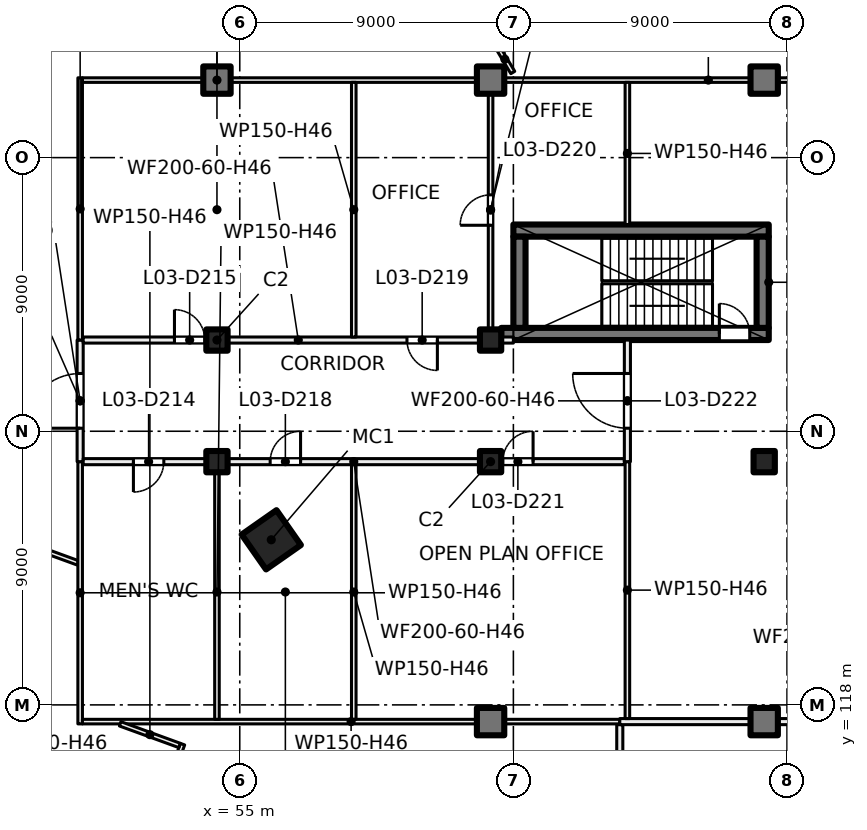
"""IFC4 building model, lengths in metres.
Left out: names, types, materials, properties, quantities, classifications, styles, units other than length and angle.
Written with IfcOpenShell. Run it as: python <this file> out.ifc"""

import sys

from ifc_helpers import new_model, si_unit, direction, frame, frame_2d, origin, origin_2d, place, context, subcontext, project, spatial, rectangle, hollow_rectangle, extrude, element, fill, save


model = new_model("IFC4")
c1 = context("Model", 3, precision=1e-05, world=origin(), true_north=direction((0.0, 1.0)))
c2 = subcontext(c1, "Body", "Model", "MODEL_VIEW")
j1 = project(units=[si_unit("LENGTHUNIT", "METRE"), si_unit("PLANEANGLEUNIT", "RADIAN")], contexts=[c1])
p1 = place(None, origin())
s1 = spatial("IfcSite", under=j1, at=p1, CompositionType="ELEMENT")
p2 = place(p1, origin())
s2 = spatial("IfcBuilding", under=s1, at=p2, CompositionType="ELEMENT")
p3 = place(p2, frame((0.0, 0.0, 17.5)))
s3 = spatial("IfcBuildingStorey", under=s2, at=p3, CompositionType="ELEMENT", Elevation=17.5)
p4 = place(p3, frame((56.036, 123.43, 0.0), z_axis=(0.0, 0.0, 1.0), x_axis=(0.573576436351, -0.819152044289, 0.0)))
e1 = element("IfcColumn", 1, at=p4, inside=s3, PredefinedType="COLUMN", context=c2, shape_type="SweptSolid", body=[
    extrude(hollow_rectangle(XDim=1.4, YDim=1.4, WallThickness=0.04, at=origin_2d()), origin(), (0.0, 0.0, 1.0), 5.0),
])
for number, where, z_axis, x_axis in (
    (2, (54.25, 130.0, 0.0), (0.0, 0.0, 1.0), (1.0, 0.0, 0.0)),
    (3, (63.25, 130.0, 0.0), (0.0, 0.0, 1.0), (1.0, 0.0, 0.0)),
    (4, (54.25, 126.0, 0.0), (0.0, 0.0, 1.0), (1.0, 0.0, 0.0)),
    (5, (63.25, 126.0, 0.0), (0.0, 0.0, 1.0), (1.0, 0.0, 0.0)),
    (6, (72.25, 126.0, 0.0), (0.0, 0.0, 1.0), (1.0, 0.0, 0.0)),
):
    element("IfcColumn", number, at=place(p3, frame(where, z_axis=z_axis, x_axis=x_axis)), inside=s3, PredefinedType="COLUMN", context=c2, shape_type="SweptSolid", body=[
        extrude(rectangle(XDim=0.7, YDim=0.7, at=origin_2d()), origin(), (0.0, 0.0, 1.0), 5.0),
    ])
for number, where, z_axis, x_axis in (
    (7, (54.25, 138.55, 0.0), (0.0, 0.0, 1.0), (1.0, 0.0, 0.0)),
    (8, (63.25, 138.55, 0.0), (0.0, 0.0, 1.0), (1.0, 0.0, 0.0)),
    (9, (72.25, 138.55, 0.0), (0.0, 0.0, 1.0), (1.0, 0.0, 0.0)),
    (10, (63.25, 117.45, 0.0), (0.0, 0.0, 1.0), (1.0, 0.0, 0.0)),
    (11, (72.25, 117.45, 0.0), (0.0, 0.0, 1.0), (1.0, 0.0, 0.0)),
):
    element("IfcColumn", number, at=place(p3, frame(where, z_axis=z_axis, x_axis=x_axis)), inside=s3, PredefinedType="COLUMN", context=c2, shape_type="SweptSolid", body=[
        extrude(rectangle(XDim=0.9, YDim=0.9, at=origin_2d()), origin(), (0.0, 0.0, 1.0), 5.0),
    ])
p5 = place(p3, frame((63.6, 130.2, 0.0), z_axis=(0.0, 0.0, 1.0), x_axis=(1.0, 0.0, 0.0)))
e12 = element("IfcWall", 12, at=p5, inside=s3, PredefinedType="SHEAR", context=c2, shape_type="SweptSolid", body=[
    extrude(rectangle(XDim=8.8, YDim=0.4, at=frame_2d((4.4, 0.0))), origin(), (0.0, 0.0, 1.0), 5.0),
])
p6 = place(p5, frame((7.175, 0.0, 0.0)))
e13 = element("IfcOpeningElement", 13, at=p6, cuts=e12, PredefinedType="OPENING", context=c2, shape_type="SweptSolid", body=[
    extrude(rectangle(XDim=1.0, YDim=2.1, at=frame_2d((0.5, 1.05))), frame((0.0, 0.21, 0.0), z_axis=(0.0, -1.0, 0.0), x_axis=(1.0, 0.0, 0.0)), (0.0, 0.0, 1.0), 0.42),
])
p7 = place(p3, frame((64.0, 133.6, 0.0), z_axis=(0.0, 0.0, 1.0), x_axis=(1.0, 0.0, 0.0)))
e14 = element("IfcWall", 14, at=p7, inside=s3, PredefinedType="SHEAR", context=c2, shape_type="SweptSolid", body=[
    extrude(rectangle(XDim=8.4, YDim=0.4, at=frame_2d((4.2, 0.0))), origin(), (0.0, 0.0, 1.0), 5.0),
])
for number, where, z_axis, x_axis in (
    (15, (64.2, 130.4, 0.0), (0.0, 0.0, 1.0), (0.0, 1.0, 0.0)),
    (16, (72.2, 130.4, 0.0), (0.0, 0.0, 1.0), (0.0, 1.0, 0.0)),
):
    element("IfcWall", number, at=place(p3, frame(where, z_axis=z_axis, x_axis=x_axis)), inside=s3, PredefinedType="SHEAR", context=c2, shape_type="SweptSolid", body=[
        extrude(rectangle(XDim=3.0, YDim=0.4, at=frame_2d((1.5, 0.0))), origin(), (0.0, 0.0, 1.0), 5.0),
    ])
p8 = place(p3, frame((46.597, 123.792, 0.0), z_axis=(0.0, 0.0, 1.0), x_axis=(0.939619227089, -0.342221723572, 0.0)))
e17 = element("IfcWall", 17, at=p8, inside=s3, PredefinedType="PARTITIONING", context=c2, shape_type="SweptSolid", body=[
    extrude(rectangle(XDim=3.276, YDim=0.15, at=frame_2d((1.638, 0.0))), origin(), (0.0, 0.0, 1.0), 4.6),
])
p9 = place(p3, frame((48.475, 103.953, 0.0), z_axis=(0.0, 0.0, 1.0), x_axis=(0.342018860609, 0.939693087656, 0.0)))
e18 = element("IfcWall", 18, at=p9, inside=s3, PredefinedType="PARTITIONING", context=c2, shape_type="SweptSolid", body=[
    extrude(rectangle(XDim=13.575, YDim=0.15, at=frame_2d((6.787, 0.0))), origin(), (0.0, 0.0, 1.0), 4.6),
])
p10 = place(p3, frame((49.75, 117.375, 0.0), z_axis=(0.0, 0.0, 1.0), x_axis=(0.0, 1.0, 0.0)))
e19 = element("IfcWall", 19, at=p10, inside=s3, PredefinedType="PARTITIONING", context=c2, shape_type="SweptSolid", body=[
    extrude(rectangle(XDim=8.625, YDim=0.15, at=frame_2d((4.312, 0.0))), origin(), (0.0, 0.0, 1.0), 4.6),
])
p11 = place(p3, frame((49.825, 117.45, 0.0), z_axis=(0.0, 0.0, 1.0), x_axis=(1.0, 0.0, 0.0)))
e20 = element("IfcWall", 20, at=p11, inside=s3, PredefinedType="PARTITIONING", context=c2, shape_type="SweptSolid", body=[
    extrude(rectangle(XDim=17.675, YDim=0.15, at=frame_2d((8.837, 0.0))), origin(), (0.0, 0.0, 1.0), 4.6),
])
p12 = place(p3, frame((49.75, 126.0, 0.0), z_axis=(0.0, 0.0, 1.0), x_axis=(0.0, 1.0, 0.0)))
e21 = element("IfcWall", 21, at=p12, inside=s3, PredefinedType="PARTITIONING", context=c2, shape_type="SweptSolid", body=[
    extrude(rectangle(XDim=4.0, YDim=0.2, at=frame_2d((2.0, 0.0))), origin(), (0.0, 0.0, 1.0), 4.6),
])
p13 = place(p12, frame((1.1, 0.0, 0.0)))
e22 = element("IfcOpeningElement", 22, at=p13, cuts=e21, PredefinedType="OPENING", context=c2, shape_type="SweptSolid", body=[
    extrude(rectangle(XDim=1.8, YDim=2.1, at=frame_2d((0.9, 1.05))), frame((0.0, 0.11, 0.0), z_axis=(0.0, -1.0, 0.0), x_axis=(1.0, 0.0, 0.0)), (0.0, 0.0, 1.0), 0.22),
])
p14 = place(p3, frame((67.65, 126.0, 0.0), z_axis=(0.0, 0.0, 1.0), x_axis=(-1.0, 0.0, 0.0)))
e23 = element("IfcWall", 23, at=p14, inside=s3, PredefinedType="PARTITIONING", context=c2, shape_type="SweptSolid", body=[
    extrude(rectangle(XDim=17.8, YDim=0.2, at=frame_2d((8.9, 0.0))), origin(), (0.0, 0.0, 1.0), 4.6),
])
p15 = place(p14, frame((15.148, 0.0, 0.0)))
e24 = element("IfcOpeningElement", 24, at=p15, cuts=e23, PredefinedType="OPENING", context=c2, shape_type="SweptSolid", body=[
    extrude(rectangle(XDim=1.0, YDim=2.1, at=frame_2d((0.5, 1.05))), frame((0.0, 0.11, 0.0), z_axis=(0.0, -1.0, 0.0), x_axis=(1.0, 0.0, 0.0)), (0.0, 0.0, 1.0), 0.22),
])
p16 = place(p14, frame((10.65, 0.0, 0.0)))
e25 = element("IfcOpeningElement", 25, at=p16, cuts=e23, PredefinedType="OPENING", context=c2, shape_type="SweptSolid", body=[
    extrude(rectangle(XDim=1.0, YDim=2.1, at=frame_2d((0.5, 1.05))), frame((0.0, 0.11, 0.0), z_axis=(0.0, -1.0, 0.0), x_axis=(1.0, 0.0, 0.0)), (0.0, 0.0, 1.0), 0.22),
])
p17 = place(p14, frame((3.002, 0.0, 0.0)))
e26 = element("IfcOpeningElement", 26, at=p17, cuts=e23, PredefinedType="OPENING", context=c2, shape_type="SweptSolid", body=[
    extrude(rectangle(XDim=1.0, YDim=2.1, at=frame_2d((0.5, 1.05))), frame((0.0, 0.11, 0.0), z_axis=(0.0, -1.0, 0.0), x_axis=(1.0, 0.0, 0.0)), (0.0, 0.0, 1.0), 0.22),
])
p18 = place(p3, frame((49.75, 130.0, 0.0), z_axis=(0.0, 0.0, 1.0), x_axis=(0.0, 1.0, 0.0)))
e27 = element("IfcWall", 27, at=p18, inside=s3, PredefinedType="PARTITIONING", context=c2, shape_type="SweptSolid", body=[
    extrude(rectangle(XDim=8.625, YDim=0.15, at=frame_2d((4.312, 0.0))), origin(), (0.0, 0.0, 1.0), 4.6),
])
p19 = place(p3, frame((49.85, 130.0, 0.0), z_axis=(0.0, 0.0, 1.0), x_axis=(1.0, 0.0, 0.0)))
e28 = element("IfcWall", 28, at=p19, inside=s3, PredefinedType="PARTITIONING", context=c2, shape_type="SweptSolid", body=[
    extrude(rectangle(XDim=14.15, YDim=0.2, at=frame_2d((7.075, 0.0))), origin(), (0.0, 0.0, 1.0), 4.6),
])
p20 = place(p19, frame((3.002, 0.0, 0.0)))
e29 = element("IfcOpeningElement", 29, at=p20, cuts=e28, PredefinedType="OPENING", context=c2, shape_type="SweptSolid", body=[
    extrude(rectangle(XDim=1.0, YDim=2.1, at=frame_2d((0.5, 1.05))), frame((0.0, 0.11, 0.0), z_axis=(0.0, -1.0, 0.0), x_axis=(1.0, 0.0, 0.0)), (0.0, 0.0, 1.0), 0.22),
])
p21 = place(p19, frame((10.65, 0.0, 0.0)))
e30 = element("IfcOpeningElement", 30, at=p21, cuts=e28, PredefinedType="OPENING", context=c2, shape_type="SweptSolid", body=[
    extrude(rectangle(XDim=1.0, YDim=2.1, at=frame_2d((0.5, 1.05))), frame((0.0, 0.11, 0.0), z_axis=(0.0, -1.0, 0.0), x_axis=(1.0, 0.0, 0.0)), (0.0, 0.0, 1.0), 0.22),
])
p22 = place(p3, frame((49.825, 138.55, 0.0), z_axis=(0.0, 0.0, 1.0), x_axis=(1.0, 0.0, 0.0)))
e31 = element("IfcWall", 31, at=p22, inside=s3, PredefinedType="PARTITIONING", context=c2, shape_type="SweptSolid", body=[
    extrude(rectangle(XDim=41.175, YDim=0.15, at=frame_2d((20.587, 0.0))), origin(), (0.0, 0.0, 1.0), 4.6),
])
p23 = place(p22, frame((37.775, 0.0, 0.0)))
e32 = element("IfcOpeningElement", 32, at=p23, cuts=e31, PredefinedType="OPENING", context=c2, shape_type="SweptSolid", body=[
    extrude(rectangle(XDim=1.8, YDim=2.1, at=frame_2d((0.9, 1.05))), frame((0.0, 0.085, 0.0), z_axis=(0.0, -1.0, 0.0), x_axis=(1.0, 0.0, 0.0)), (0.0, 0.0, 1.0), 0.17),
])
p24 = place(p3, frame((51.066, 117.377, 0.0), z_axis=(0.0, 0.0, 1.0), x_axis=(0.939697502841, -0.342006729691, 0.0)))
e33 = element("IfcWall", 33, at=p24, inside=s3, PredefinedType="PARTITIONING", context=c2, shape_type="SweptSolid", body=[
    extrude(rectangle(XDim=2.082, YDim=0.15, at=frame_2d((1.041, 0.0))), origin(), (0.0, 0.0, 1.0), 4.6),
])
for number, where, z_axis, x_axis in (
    (34, (54.25, 117.525, 0.0), (0.0, 0.0, 1.0), (0.0, 1.0, 0.0)),
    (35, (58.75, 117.525, 0.0), (0.0, 0.0, 1.0), (0.0, 1.0, 0.0)),
    (36, (58.75, 130.1, 0.0), (0.0, 0.0, 1.0), (0.0, 1.0, 0.0)),
):
    element("IfcWall", number, at=place(p3, frame(where, z_axis=z_axis, x_axis=x_axis)), inside=s3, PredefinedType="PARTITIONING", context=c2, shape_type="SweptSolid", body=[
        extrude(rectangle(XDim=8.375, YDim=0.15, at=frame_2d((4.188, 0.0))), origin(), (0.0, 0.0, 1.0), 4.6),
    ])
p25 = place(p3, frame((63.25, 130.1, 0.0), z_axis=(0.0, 0.0, 1.0), x_axis=(0.0, 1.0, 0.0)))
e37 = element("IfcWall", 37, at=p25, inside=s3, PredefinedType="PARTITIONING", context=c2, shape_type="SweptSolid", body=[
    extrude(rectangle(XDim=8.375, YDim=0.15, at=frame_2d((4.188, 0.0))), origin(), (0.0, 0.0, 1.0), 4.6),
])
p26 = place(p25, frame((3.675, 0.0, 0.0)))
e38 = element("IfcOpeningElement", 38, at=p26, cuts=e37, PredefinedType="OPENING", context=c2, shape_type="SweptSolid", body=[
    extrude(rectangle(XDim=1.0, YDim=2.1, at=frame_2d((0.5, 1.05))), frame((0.0, 0.085, 0.0), z_axis=(0.0, -1.0, 0.0), x_axis=(1.0, 0.0, 0.0)), (0.0, 0.0, 1.0), 0.17),
])
p27 = place(p3, frame((63.459, 139.67, 0.0), z_axis=(0.0, 0.0, 1.0), x_axis=(0.514106720628, -0.857726226604, 0.0)))
e39 = element("IfcWall", 39, at=p27, inside=s3, PredefinedType="PARTITIONING", context=c2, shape_type="SweptSolid", body=[
    extrude(rectangle(XDim=1.015, YDim=0.15, at=frame_2d((0.508, 0.0))), origin(), (0.0, 0.0, 1.0), 4.6),
])
p28 = place(p3, frame((67.5, 109.1, 0.0), z_axis=(0.0, 0.0, 1.0), x_axis=(0.0, 1.0, 0.0)))
e40 = element("IfcWall", 40, at=p28, inside=s3, PredefinedType="PARTITIONING", context=c2, shape_type="SweptSolid", body=[
    extrude(rectangle(XDim=8.25, YDim=0.2, at=frame_2d((4.125, 0.0))), origin(), (0.0, 0.0, 1.0), 3.6),
])
p29 = place(p3, frame((67.5, 117.45, 0.0), z_axis=(0.0, 0.0, 1.0), x_axis=(1.0, 0.0, 0.0)))
e41 = element("IfcWall", 41, at=p29, inside=s3, PredefinedType="PARTITIONING", context=c2, shape_type="SweptSolid", body=[
    extrude(rectangle(XDim=13.5, YDim=0.2, at=frame_2d((6.75, 0.0))), origin(), (0.0, 0.0, 1.0), 4.6),
])
p30 = place(p29, frame((5.977, 0.0, 0.0)))
e42 = element("IfcOpeningElement", 42, at=p30, cuts=e41, PredefinedType="OPENING", context=c2, shape_type="SweptSolid", body=[
    extrude(rectangle(XDim=1.8, YDim=2.1, at=frame_2d((0.9, 1.05))), frame((0.0, 0.11, 0.0), z_axis=(0.0, -1.0, 0.0), x_axis=(1.0, 0.0, 0.0)), (0.0, 0.0, 1.0), 0.22),
])
p31 = place(p3, frame((67.75, 117.55, 0.0), z_axis=(0.0, 0.0, 1.0), x_axis=(0.0, 1.0, 0.0)))
e43 = element("IfcWall", 43, at=p31, inside=s3, PredefinedType="PARTITIONING", context=c2, shape_type="SweptSolid", body=[
    extrude(rectangle(XDim=8.45, YDim=0.15, at=frame_2d((4.225, 0.0))), origin(), (0.0, 0.0, 1.0), 4.6),
])
p32 = place(p3, frame((67.75, 130.0, 0.0), z_axis=(0.0, 0.0, 1.0), x_axis=(0.0, -1.0, 0.0)))
e44 = element("IfcWall", 44, at=p32, inside=s3, PredefinedType="PARTITIONING", context=c2, shape_type="SweptSolid", body=[
    extrude(rectangle(XDim=4.0, YDim=0.2, at=frame_2d((2.0, 0.0))), origin(), (0.0, 0.0, 1.0), 4.6),
])
p33 = place(p32, frame((1.1, 0.0, 0.0)))
e45 = element("IfcOpeningElement", 45, at=p33, cuts=e44, PredefinedType="OPENING", context=c2, shape_type="SweptSolid", body=[
    extrude(rectangle(XDim=1.8, YDim=2.1, at=frame_2d((0.9, 1.05))), frame((0.0, 0.11, 0.0), z_axis=(0.0, -1.0, 0.0), x_axis=(1.0, 0.0, 0.0)), (0.0, 0.0, 1.0), 0.22),
])
p34 = place(p3, frame((67.75, 133.8, 0.0), z_axis=(0.0, 0.0, 1.0), x_axis=(0.0, 1.0, 0.0)))
e46 = element("IfcWall", 46, at=p34, inside=s3, PredefinedType="PARTITIONING", context=c2, shape_type="SweptSolid", body=[
    extrude(rectangle(XDim=4.675, YDim=0.15, at=frame_2d((2.337, 0.0))), origin(), (0.0, 0.0, 1.0), 4.6),
])
p35 = place(p6, origin())
e47 = element("IfcDoor", 47, at=p35, inside=s3, OperationType="SINGLE_SWING_LEFT", PredefinedType="DOOR", context=c2, shape_type="SweptSolid", body=[
    extrude(rectangle(XDim=1.0, YDim=2.1, at=frame_2d((0.5, 1.05))), frame((0.0, 0.025, 0.0), z_axis=(0.0, -1.0, 0.0), x_axis=(1.0, 0.0, 0.0)), (0.0, 0.0, 1.0), 0.05),
])
fill(e13, e47)
p36 = place(p13, origin())
e48 = element("IfcDoor", 48, at=p36, inside=s3, OperationType="DOUBLE_DOOR_SINGLE_SWING", PredefinedType="DOOR", context=c2, shape_type="SweptSolid", body=[
    extrude(rectangle(XDim=1.8, YDim=2.1, at=frame_2d((0.9, 1.05))), frame((0.0, 0.025, 0.0), z_axis=(0.0, -1.0, 0.0), x_axis=(1.0, 0.0, 0.0)), (0.0, 0.0, 1.0), 0.05),
])
fill(e22, e48)
p37 = place(p15, origin())
e49 = element("IfcDoor", 49, at=p37, inside=s3, OperationType="SINGLE_SWING_RIGHT", PredefinedType="DOOR", context=c2, shape_type="SweptSolid", body=[
    extrude(rectangle(XDim=1.0, YDim=2.1, at=frame_2d((0.5, 1.05))), frame((0.0, 0.025, 0.0), z_axis=(0.0, -1.0, 0.0), x_axis=(1.0, 0.0, 0.0)), (0.0, 0.0, 1.0), 0.05),
])
fill(e24, e49)
p38 = place(p20, origin())
e50 = element("IfcDoor", 50, at=p38, inside=s3, OperationType="SINGLE_SWING_LEFT", PredefinedType="DOOR", context=c2, shape_type="SweptSolid", body=[
    extrude(rectangle(XDim=1.0, YDim=2.1, at=frame_2d((0.5, 1.05))), frame((0.0, 0.025, 0.0), z_axis=(0.0, -1.0, 0.0), x_axis=(1.0, 0.0, 0.0)), (0.0, 0.0, 1.0), 0.05),
])
fill(e29, e50)
p39 = place(p16, origin())
e51 = element("IfcDoor", 51, at=p39, inside=s3, OperationType="SINGLE_SWING_LEFT", PredefinedType="DOOR", context=c2, shape_type="SweptSolid", body=[
    extrude(rectangle(XDim=1.0, YDim=2.1, at=frame_2d((0.5, 1.05))), frame((0.0, 0.025, 0.0), z_axis=(0.0, -1.0, 0.0), x_axis=(1.0, 0.0, 0.0)), (0.0, 0.0, 1.0), 0.05),
])
fill(e25, e51)
p40 = place(p21, origin())
e52 = element("IfcDoor", 52, at=p40, inside=s3, OperationType="SINGLE_SWING_RIGHT", PredefinedType="DOOR", context=c2, shape_type="SweptSolid", body=[
    extrude(rectangle(XDim=1.0, YDim=2.1, at=frame_2d((0.5, 1.05))), frame((0.0, 0.025, 0.0), z_axis=(0.0, -1.0, 0.0), x_axis=(1.0, 0.0, 0.0)), (0.0, 0.0, 1.0), 0.05),
])
fill(e30, e52)
p41 = place(p26, origin())
e53 = element("IfcDoor", 53, at=p41, inside=s3, OperationType="SINGLE_SWING_LEFT", PredefinedType="DOOR", context=c2, shape_type="SweptSolid", body=[
    extrude(rectangle(XDim=1.0, YDim=2.1, at=frame_2d((0.5, 1.05))), frame((0.0, 0.025, 0.0), z_axis=(0.0, -1.0, 0.0), x_axis=(1.0, 0.0, 0.0)), (0.0, 0.0, 1.0), 0.05),
])
fill(e38, e53)
p42 = place(p17, origin())
e54 = element("IfcDoor", 54, at=p42, inside=s3, OperationType="SINGLE_SWING_LEFT", PredefinedType="DOOR", context=c2, shape_type="SweptSolid", body=[
    extrude(rectangle(XDim=1.0, YDim=2.1, at=frame_2d((0.5, 1.05))), frame((0.0, 0.025, 0.0), z_axis=(0.0, -1.0, 0.0), x_axis=(1.0, 0.0, 0.0)), (0.0, 0.0, 1.0), 0.05),
])
fill(e26, e54)
p43 = place(p33, origin())
e55 = element("IfcDoor", 55, at=p43, inside=s3, OperationType="DOUBLE_DOOR_SINGLE_SWING", PredefinedType="DOOR", context=c2, shape_type="SweptSolid", body=[
    extrude(rectangle(XDim=1.8, YDim=2.1, at=frame_2d((0.9, 1.05))), frame((0.0, 0.025, 0.0), z_axis=(0.0, -1.0, 0.0), x_axis=(1.0, 0.0, 0.0)), (0.0, 0.0, 1.0), 0.05),
])
fill(e45, e55)
save(model, sys.argv[1])
